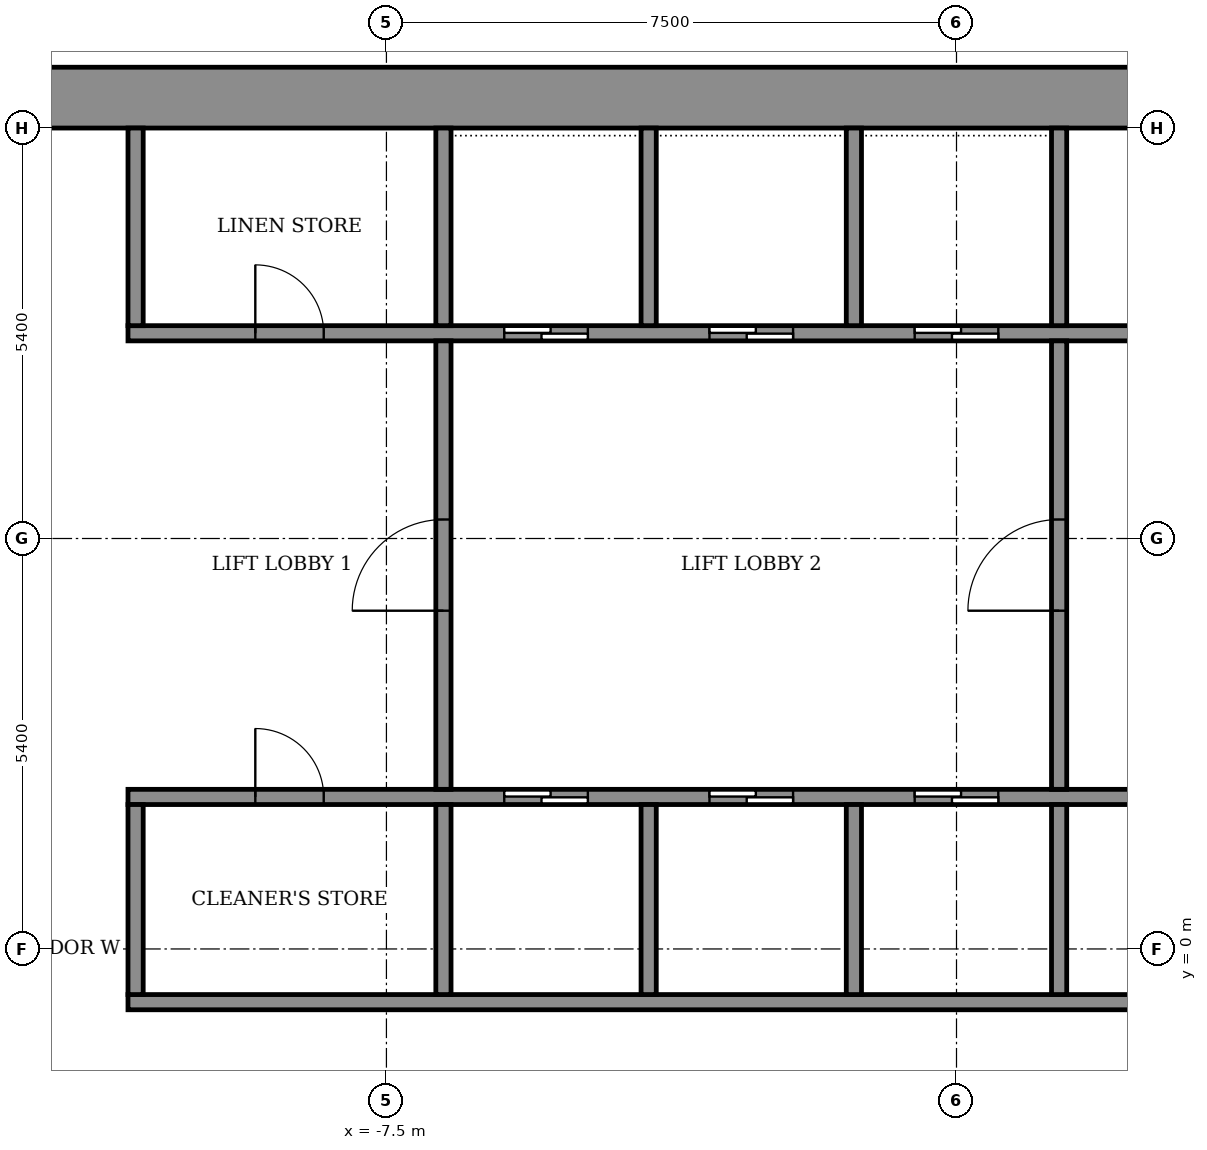
"""IFC4 building model, lengths in metres.
Left out: names, types, materials, properties, quantities, classifications, styles, units other than length and angle.
Written with IfcOpenShell. Run it as: python <this file> out.ifc"""

import sys

from ifc_helpers import new_model, si_unit, direction, frame, frame_2d, origin, place, context, subcontext, project, spatial, rectangle, extrude, element, fill, save


model = new_model("IFC4")
c1 = context("Model", 3, precision=1e-05, world=origin(), true_north=direction((0.0, 1.0)))
c2 = subcontext(c1, "Body", "Model", "MODEL_VIEW")
j1 = project(units=[si_unit("LENGTHUNIT", "METRE"), si_unit("PLANEANGLEUNIT", "RADIAN")], contexts=[c1])
p1 = place(None, origin())
s1 = spatial("IfcSite", under=j1, at=p1, CompositionType="ELEMENT")
p2 = place(p1, origin())
s2 = spatial("IfcBuilding", under=s1, at=p2, CompositionType="ELEMENT")
p3 = place(p2, frame((0.0, 0.0, 249.1)))
s3 = spatial("IfcBuildingStorey", under=s2, at=p3, CompositionType="ELEMENT", Elevation=249.1)
p4 = place(p3, frame((-14.6, 11.2, 0.0), z_axis=(0.0, 0.0, 1.0), x_axis=(1.0, 0.0, 0.0)))
e1 = element("IfcWall", 1, at=p4, inside=s3, PredefinedType="SHEAR", context=c2, shape_type="SweptSolid", body=[
    extrude(rectangle(XDim=29.2, YDim=0.8, at=frame_2d((14.6, 0.0))), origin(), (0.0, 0.0, 1.0), 3.6),
])
p5 = place(p3, frame((-10.9, -0.7, 0.0), z_axis=(0.0, 0.0, 1.0), x_axis=(1.0, 0.0, 0.0)))
e2 = element("IfcWall", 2, at=p5, inside=s3, PredefinedType="SHEAR", context=c2, shape_type="SweptSolid", body=[
    extrude(rectangle(XDim=21.8, YDim=0.2, at=frame_2d((10.9, 0.0))), origin(), (0.0, 0.0, 1.0), 3.05),
])
p6 = place(p3, frame((-10.9, 2.0, 0.0), z_axis=(0.0, 0.0, 1.0), x_axis=(1.0, 0.0, 0.0)))
e3 = element("IfcWall", 3, at=p6, inside=s3, PredefinedType="SHEAR", context=c2, shape_type="SweptSolid", body=[
    extrude(rectangle(XDim=21.8, YDim=0.2, at=frame_2d((10.9, 0.0))), origin(), (0.0, 0.0, 1.0), 3.05),
])
p7 = place(p6, frame((4.95, 0.0, 0.0)))
e4 = element("IfcOpeningElement", 4, at=p7, cuts=e3, PredefinedType="OPENING", context=c2, shape_type="SweptSolid", body=[
    extrude(rectangle(XDim=1.1, YDim=2.1, at=frame_2d((0.55, 1.05))), frame((0.0, 0.11, 0.0), z_axis=(0.0, -1.0, 0.0), x_axis=(1.0, 0.0, 0.0)), (0.0, 0.0, 1.0), 0.22),
])
p8 = place(p6, frame((7.65, 0.0, 0.0)))
e5 = element("IfcOpeningElement", 5, at=p8, cuts=e3, PredefinedType="OPENING", context=c2, shape_type="SweptSolid", body=[
    extrude(rectangle(XDim=1.1, YDim=2.1, at=frame_2d((0.55, 1.05))), frame((0.0, 0.11, 0.0), z_axis=(0.0, -1.0, 0.0), x_axis=(1.0, 0.0, 0.0)), (0.0, 0.0, 1.0), 0.22),
])
p9 = place(p6, frame((10.35, 0.0, 0.0)))
e6 = element("IfcOpeningElement", 6, at=p9, cuts=e3, PredefinedType="OPENING", context=c2, shape_type="SweptSolid", body=[
    extrude(rectangle(XDim=1.1, YDim=2.1, at=frame_2d((0.55, 1.05))), frame((0.0, 0.11, 0.0), z_axis=(0.0, -1.0, 0.0), x_axis=(1.0, 0.0, 0.0)), (0.0, 0.0, 1.0), 0.22),
])
p10 = place(p6, frame((1.675, 0.0, 0.0)))
e7 = element("IfcOpeningElement", 7, at=p10, cuts=e3, PredefinedType="OPENING", context=c2, shape_type="SweptSolid", body=[
    extrude(rectangle(XDim=0.9, YDim=2.1, at=frame_2d((0.45, 1.05))), frame((0.0, 0.11, 0.0), z_axis=(0.0, -1.0, 0.0), x_axis=(1.0, 0.0, 0.0)), (0.0, 0.0, 1.0), 0.22),
])
p11 = place(p6, frame((14.5, 0.0, 0.0)))
e8 = element("IfcOpeningElement", 8, at=p11, cuts=e3, PredefinedType="OPENING", context=c2, shape_type="SweptSolid", body=[
    extrude(rectangle(XDim=0.9, YDim=2.1, at=frame_2d((0.45, 1.05))), frame((0.0, 0.11, 0.0), z_axis=(0.0, -1.0, 0.0), x_axis=(1.0, 0.0, 0.0)), (0.0, 0.0, 1.0), 0.22),
])
p12 = place(p6, frame((19.225, 0.0, 0.0)))
e9 = element("IfcOpeningElement", 9, at=p12, cuts=e3, PredefinedType="OPENING", context=c2, shape_type="SweptSolid", body=[
    extrude(rectangle(XDim=0.9, YDim=2.1, at=frame_2d((0.45, 1.05))), frame((0.0, 0.11, 0.0), z_axis=(0.0, -1.0, 0.0), x_axis=(1.0, 0.0, 0.0)), (0.0, 0.0, 1.0), 0.22),
])
p13 = place(p3, frame((-10.9, 8.1, 0.0), z_axis=(0.0, 0.0, 1.0), x_axis=(1.0, 0.0, 0.0)))
e10 = element("IfcWall", 10, at=p13, inside=s3, PredefinedType="SHEAR", context=c2, shape_type="SweptSolid", body=[
    extrude(rectangle(XDim=21.8, YDim=0.2, at=frame_2d((10.9, 0.0))), origin(), (0.0, 0.0, 1.0), 3.05),
])
p14 = place(p13, frame((4.95, 0.0, 0.0)))
e11 = element("IfcOpeningElement", 11, at=p14, cuts=e10, PredefinedType="OPENING", context=c2, shape_type="SweptSolid", body=[
    extrude(rectangle(XDim=1.1, YDim=2.1, at=frame_2d((0.55, 1.05))), frame((0.0, 0.11, 0.0), z_axis=(0.0, -1.0, 0.0), x_axis=(1.0, 0.0, 0.0)), (0.0, 0.0, 1.0), 0.22),
])
p15 = place(p13, frame((7.65, 0.0, 0.0)))
e12 = element("IfcOpeningElement", 12, at=p15, cuts=e10, PredefinedType="OPENING", context=c2, shape_type="SweptSolid", body=[
    extrude(rectangle(XDim=1.1, YDim=2.1, at=frame_2d((0.55, 1.05))), frame((0.0, 0.11, 0.0), z_axis=(0.0, -1.0, 0.0), x_axis=(1.0, 0.0, 0.0)), (0.0, 0.0, 1.0), 0.22),
])
p16 = place(p13, frame((10.35, 0.0, 0.0)))
e13 = element("IfcOpeningElement", 13, at=p16, cuts=e10, PredefinedType="OPENING", context=c2, shape_type="SweptSolid", body=[
    extrude(rectangle(XDim=1.1, YDim=2.1, at=frame_2d((0.55, 1.05))), frame((0.0, 0.11, 0.0), z_axis=(0.0, -1.0, 0.0), x_axis=(1.0, 0.0, 0.0)), (0.0, 0.0, 1.0), 0.22),
])
p17 = place(p13, frame((1.675, 0.0, 0.0)))
e14 = element("IfcOpeningElement", 14, at=p17, cuts=e10, PredefinedType="OPENING", context=c2, shape_type="SweptSolid", body=[
    extrude(rectangle(XDim=0.9, YDim=2.1, at=frame_2d((0.45, 1.05))), frame((0.0, 0.11, 0.0), z_axis=(0.0, -1.0, 0.0), x_axis=(1.0, 0.0, 0.0)), (0.0, 0.0, 1.0), 0.22),
])
p18 = place(p13, frame((14.5, 0.0, 0.0)))
e15 = element("IfcOpeningElement", 15, at=p18, cuts=e10, PredefinedType="OPENING", context=c2, shape_type="SweptSolid", body=[
    extrude(rectangle(XDim=0.9, YDim=2.1, at=frame_2d((0.45, 1.05))), frame((0.0, 0.11, 0.0), z_axis=(0.0, -1.0, 0.0), x_axis=(1.0, 0.0, 0.0)), (0.0, 0.0, 1.0), 0.22),
])
p19 = place(p13, frame((19.225, 0.0, 0.0)))
e16 = element("IfcOpeningElement", 16, at=p19, cuts=e10, PredefinedType="OPENING", context=c2, shape_type="SweptSolid", body=[
    extrude(rectangle(XDim=0.9, YDim=2.1, at=frame_2d((0.45, 1.05))), frame((0.0, 0.11, 0.0), z_axis=(0.0, -1.0, 0.0), x_axis=(1.0, 0.0, 0.0)), (0.0, 0.0, 1.0), 0.22),
])
p20 = place(p3, frame((-10.8, -0.6, 0.0), z_axis=(0.0, 0.0, 1.0), x_axis=(0.0, 1.0, 0.0)))
e17 = element("IfcWall", 17, at=p20, inside=s3, PredefinedType="STANDARD", context=c2, shape_type="SweptSolid", body=[
    extrude(rectangle(XDim=2.5, YDim=0.2, at=frame_2d((1.25, 0.0))), origin(), (0.0, 0.0, 1.0), 3.05),
])
for number, where, z_axis, x_axis in (
    (18, (-6.75, -0.6, 0.0), (0.0, 0.0, 1.0), (0.0, 1.0, 0.0)),
    (19, (-4.05, -0.6, 0.0), (0.0, 0.0, 1.0), (0.0, 1.0, 0.0)),
    (20, (-1.35, -0.6, 0.0), (0.0, 0.0, 1.0), (0.0, 1.0, 0.0)),
    (21, (1.35, -0.6, 0.0), (0.0, 0.0, 1.0), (0.0, 1.0, 0.0)),
):
    element("IfcWall", number, at=place(p3, frame(where, z_axis=z_axis, x_axis=x_axis)), inside=s3, PredefinedType="SHEAR", context=c2, shape_type="SweptSolid", body=[
        extrude(rectangle(XDim=2.5, YDim=0.2, at=frame_2d((1.25, 0.0))), origin(), (0.0, 0.0, 1.0), 3.05),
    ])
p21 = place(p3, frame((-10.8, 8.2, 0.0), z_axis=(0.0, 0.0, 1.0), x_axis=(0.0, 1.0, 0.0)))
e22 = element("IfcWall", 22, at=p21, inside=s3, PredefinedType="STANDARD", context=c2, shape_type="SweptSolid", body=[
    extrude(rectangle(XDim=2.6, YDim=0.2, at=frame_2d((1.3, 0.0))), origin(), (0.0, 0.0, 1.0), 3.05),
])
for number, where, z_axis, x_axis in (
    (23, (-6.75, 8.2, 0.0), (0.0, 0.0, 1.0), (0.0, 1.0, 0.0)),
    (24, (-4.05, 8.2, 0.0), (0.0, 0.0, 1.0), (0.0, 1.0, 0.0)),
    (25, (-1.35, 8.2, 0.0), (0.0, 0.0, 1.0), (0.0, 1.0, 0.0)),
    (26, (1.35, 8.2, 0.0), (0.0, 0.0, 1.0), (0.0, 1.0, 0.0)),
):
    element("IfcWall", number, at=place(p3, frame(where, z_axis=z_axis, x_axis=x_axis)), inside=s3, PredefinedType="SHEAR", context=c2, shape_type="SweptSolid", body=[
        extrude(rectangle(XDim=2.6, YDim=0.2, at=frame_2d((1.3, 0.0))), origin(), (0.0, 0.0, 1.0), 3.05),
    ])
p22 = place(p3, frame((-6.75, 2.1, 0.0), z_axis=(0.0, 0.0, 1.0), x_axis=(0.0, 1.0, 0.0)))
e27 = element("IfcWall", 27, at=p22, inside=s3, PredefinedType="STANDARD", context=c2, shape_type="SweptSolid", body=[
    extrude(rectangle(XDim=5.9, YDim=0.2, at=frame_2d((2.95, 0.0))), origin(), (0.0, 0.0, 1.0), 3.05),
])
p23 = place(p22, frame((2.35, 0.0, 0.0)))
e28 = element("IfcOpeningElement", 28, at=p23, cuts=e27, PredefinedType="OPENING", context=c2, shape_type="SweptSolid", body=[
    extrude(rectangle(XDim=1.2, YDim=2.1, at=frame_2d((0.6, 1.05))), frame((0.0, 0.11, 0.0), z_axis=(0.0, -1.0, 0.0), x_axis=(1.0, 0.0, 0.0)), (0.0, 0.0, 1.0), 0.22),
])
p24 = place(p3, frame((1.35, 2.1, 0.0), z_axis=(0.0, 0.0, 1.0), x_axis=(0.0, 1.0, 0.0)))
e29 = element("IfcWall", 29, at=p24, inside=s3, PredefinedType="STANDARD", context=c2, shape_type="SweptSolid", body=[
    extrude(rectangle(XDim=5.9, YDim=0.2, at=frame_2d((2.95, 0.0))), origin(), (0.0, 0.0, 1.0), 3.05),
])
p25 = place(p24, frame((2.35, 0.0, 0.0)))
e30 = element("IfcOpeningElement", 30, at=p25, cuts=e29, PredefinedType="OPENING", context=c2, shape_type="SweptSolid", body=[
    extrude(rectangle(XDim=1.2, YDim=2.1, at=frame_2d((0.6, 1.05))), frame((0.0, 0.11, 0.0), z_axis=(0.0, -1.0, 0.0), x_axis=(1.0, 0.0, 0.0)), (0.0, 0.0, 1.0), 0.22),
])
p26 = place(p7, origin())
e31 = element("IfcDoor", 31, at=p26, inside=s3, OperationType="SLIDING_TO_LEFT", PredefinedType="DOOR", context=c2, shape_type="SweptSolid", body=[
    extrude(rectangle(XDim=1.1, YDim=2.1, at=frame_2d((0.55, 1.05))), frame((0.0, 0.025, 0.0), z_axis=(0.0, -1.0, 0.0), x_axis=(1.0, 0.0, 0.0)), (0.0, 0.0, 1.0), 0.05),
])
fill(e4, e31)
p27 = place(p8, origin())
e32 = element("IfcDoor", 32, at=p27, inside=s3, OperationType="SLIDING_TO_LEFT", PredefinedType="DOOR", context=c2, shape_type="SweptSolid", body=[
    extrude(rectangle(XDim=1.1, YDim=2.1, at=frame_2d((0.55, 1.05))), frame((0.0, 0.025, 0.0), z_axis=(0.0, -1.0, 0.0), x_axis=(1.0, 0.0, 0.0)), (0.0, 0.0, 1.0), 0.05),
])
fill(e5, e32)
p28 = place(p9, origin())
e33 = element("IfcDoor", 33, at=p28, inside=s3, OperationType="SLIDING_TO_LEFT", PredefinedType="DOOR", context=c2, shape_type="SweptSolid", body=[
    extrude(rectangle(XDim=1.1, YDim=2.1, at=frame_2d((0.55, 1.05))), frame((0.0, 0.025, 0.0), z_axis=(0.0, -1.0, 0.0), x_axis=(1.0, 0.0, 0.0)), (0.0, 0.0, 1.0), 0.05),
])
fill(e6, e33)
p29 = place(p14, origin())
e34 = element("IfcDoor", 34, at=p29, inside=s3, OperationType="SLIDING_TO_LEFT", PredefinedType="DOOR", context=c2, shape_type="SweptSolid", body=[
    extrude(rectangle(XDim=1.1, YDim=2.1, at=frame_2d((0.55, 1.05))), frame((0.0, 0.025, 0.0), z_axis=(0.0, -1.0, 0.0), x_axis=(1.0, 0.0, 0.0)), (0.0, 0.0, 1.0), 0.05),
])
fill(e11, e34)
p30 = place(p15, origin())
e35 = element("IfcDoor", 35, at=p30, inside=s3, OperationType="SLIDING_TO_LEFT", PredefinedType="DOOR", context=c2, shape_type="SweptSolid", body=[
    extrude(rectangle(XDim=1.1, YDim=2.1, at=frame_2d((0.55, 1.05))), frame((0.0, 0.025, 0.0), z_axis=(0.0, -1.0, 0.0), x_axis=(1.0, 0.0, 0.0)), (0.0, 0.0, 1.0), 0.05),
])
fill(e12, e35)
p31 = place(p16, origin())
e36 = element("IfcDoor", 36, at=p31, inside=s3, OperationType="SLIDING_TO_LEFT", PredefinedType="DOOR", context=c2, shape_type="SweptSolid", body=[
    extrude(rectangle(XDim=1.1, YDim=2.1, at=frame_2d((0.55, 1.05))), frame((0.0, 0.025, 0.0), z_axis=(0.0, -1.0, 0.0), x_axis=(1.0, 0.0, 0.0)), (0.0, 0.0, 1.0), 0.05),
])
fill(e13, e36)
p32 = place(p10, origin())
e37 = element("IfcDoor", 37, at=p32, inside=s3, OperationType="SINGLE_SWING_RIGHT", PredefinedType="DOOR", context=c2, shape_type="SweptSolid", body=[
    extrude(rectangle(XDim=0.9, YDim=2.1, at=frame_2d((0.45, 1.05))), frame((0.0, 0.025, 0.0), z_axis=(0.0, -1.0, 0.0), x_axis=(1.0, 0.0, 0.0)), (0.0, 0.0, 1.0), 0.05),
])
fill(e7, e37)
p33 = place(p17, origin())
e38 = element("IfcDoor", 38, at=p33, inside=s3, OperationType="SINGLE_SWING_RIGHT", PredefinedType="DOOR", context=c2, shape_type="SweptSolid", body=[
    extrude(rectangle(XDim=0.9, YDim=2.1, at=frame_2d((0.45, 1.05))), frame((0.0, 0.025, 0.0), z_axis=(0.0, -1.0, 0.0), x_axis=(1.0, 0.0, 0.0)), (0.0, 0.0, 1.0), 0.05),
])
fill(e14, e38)
p34 = place(p23, origin())
e39 = element("IfcDoor", 39, at=p34, inside=s3, OperationType="SINGLE_SWING_LEFT", PredefinedType="DOOR", context=c2, shape_type="SweptSolid", body=[
    extrude(rectangle(XDim=1.2, YDim=2.1, at=frame_2d((0.6, 1.05))), frame((0.0, 0.025, 0.0), z_axis=(0.0, -1.0, 0.0), x_axis=(1.0, 0.0, 0.0)), (0.0, 0.0, 1.0), 0.05),
])
fill(e28, e39)
p35 = place(p25, origin())
e40 = element("IfcDoor", 40, at=p35, inside=s3, OperationType="SINGLE_SWING_LEFT", PredefinedType="DOOR", context=c2, shape_type="SweptSolid", body=[
    extrude(rectangle(XDim=1.2, YDim=2.1, at=frame_2d((0.6, 1.05))), frame((0.0, 0.025, 0.0), z_axis=(0.0, -1.0, 0.0), x_axis=(1.0, 0.0, 0.0)), (0.0, 0.0, 1.0), 0.05),
])
fill(e30, e40)
save(model, sys.argv[1])
